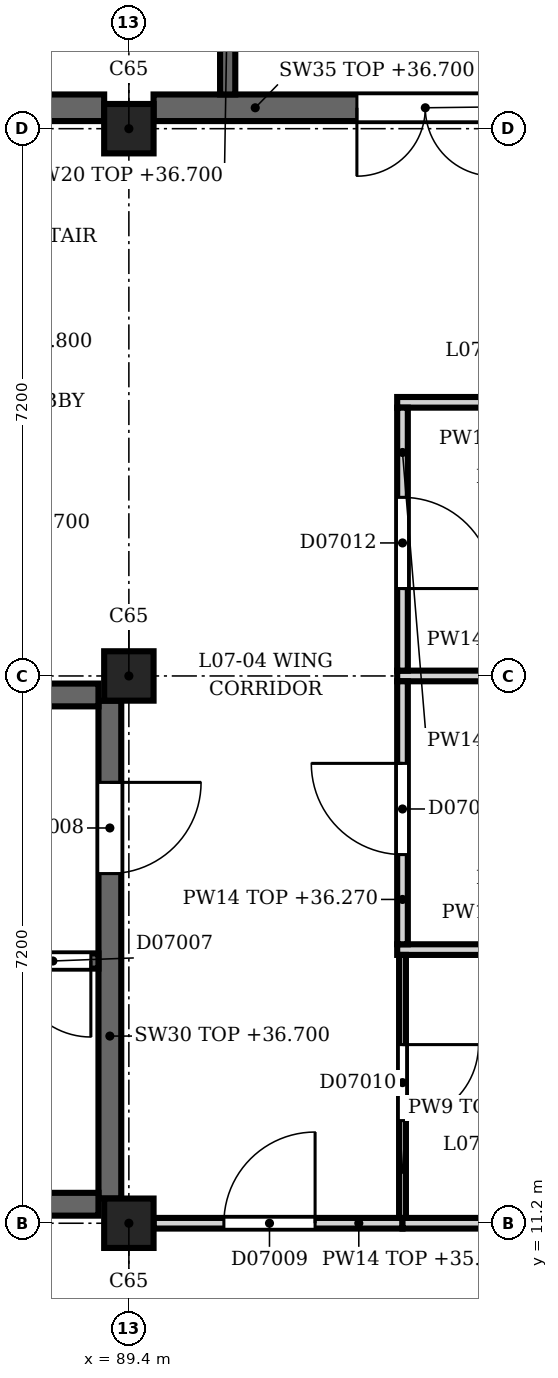
"""IFC4 building model, lengths in metres.
Left out: names, types, materials, properties, quantities, classifications, styles, units other than length and angle.
Written with IfcOpenShell. Run it as: python <this file> out.ifc"""

import sys

from ifc_helpers import new_model, si_unit, direction, frame, frame_2d, origin, origin_2d, place, context, subcontext, project, spatial, rectangle, extrude, element, fill, save


model = new_model("IFC4")
c1 = context("Model", 3, precision=1e-05, world=origin(), true_north=direction((0.0, 1.0)))
c2 = subcontext(c1, "Body", "Model", "MODEL_VIEW")
j1 = project(units=[si_unit("LENGTHUNIT", "METRE"), si_unit("PLANEANGLEUNIT", "RADIAN")], contexts=[c1])
p1 = place(None, origin())
s1 = spatial("IfcSite", under=j1, at=p1, CompositionType="ELEMENT")
p2 = place(p1, origin())
s2 = spatial("IfcBuilding", under=s1, at=p2, CompositionType="ELEMENT")
p3 = place(p2, frame((0.0, 0.0, 32.4)))
s3 = spatial("IfcBuildingStorey", under=s2, at=p3, CompositionType="ELEMENT", Elevation=32.4)
for number, where, z_axis, x_axis in (
    (1, (89.4, 11.2, 0.0), (0.0, 0.0, 1.0), (1.0, 0.0, 0.0)),
    (2, (89.4, 18.4, 0.0), (0.0, 0.0, 1.0), (1.0, 0.0, 0.0)),
    (3, (89.4, 25.6, 0.0), (0.0, 0.0, 1.0), (1.0, 0.0, 0.0)),
):
    element("IfcColumn", number, at=place(p3, frame(where, z_axis=z_axis, x_axis=x_axis)), inside=s3, PredefinedType="COLUMN", context=c2, shape_type="SweptSolid", body=[
        extrude(rectangle(XDim=0.65, YDim=0.65, at=origin_2d()), origin(), (0.0, 0.0, 1.0), 4.5),
    ])
p4 = place(p3, frame((82.45, 25.875, 0.0), z_axis=(0.0, 0.0, 1.0), x_axis=(1.0, 0.0, 0.0)))
e4 = element("IfcWall", 4, at=p4, inside=s3, PredefinedType="SHEAR", context=c2, shape_type="SweptSolid", body=[
    extrude(rectangle(XDim=6.625, YDim=0.35, at=frame_2d((3.312, 0.0))), origin(), (0.0, 0.0, 1.0), 4.3),
])
p5 = place(p4, frame((3.95, 0.0, 0.0)))
e5 = element("IfcOpeningElement", 5, at=p5, cuts=e4, PredefinedType="OPENING", context=c2, shape_type="SweptSolid", body=[
    extrude(rectangle(XDim=1.2, YDim=2.1, at=frame_2d((0.6, 1.05))), frame((0.0, 0.185, 0.0), z_axis=(0.0, -1.0, 0.0), x_axis=(1.0, 0.0, 0.0)), (0.0, 0.0, 1.0), 0.37),
])
p6 = place(p3, frame((89.725, 25.875, 0.0), z_axis=(0.0, 0.0, 1.0), x_axis=(1.0, 0.0, 0.0)))
e6 = element("IfcWall", 6, at=p6, inside=s3, PredefinedType="SHEAR", context=c2, shape_type="SweptSolid", body=[
    extrude(rectangle(XDim=6.55, YDim=0.35, at=frame_2d((3.275, 0.0))), origin(), (0.0, 0.0, 1.0), 4.3),
])
p7 = place(p6, frame((2.675, 0.0, 0.0)))
e7 = element("IfcOpeningElement", 7, at=p7, cuts=e6, PredefinedType="OPENING", context=c2, shape_type="SweptSolid", body=[
    extrude(rectangle(XDim=1.8, YDim=2.1, at=frame_2d((0.9, 1.05))), frame((0.0, 0.185, 0.0), z_axis=(0.0, -1.0, 0.0), x_axis=(1.0, 0.0, 0.0)), (0.0, 0.0, 1.0), 0.37),
])
p8 = place(p3, frame((90.7, 26.05, 0.0), z_axis=(0.0, 0.0, 1.0), x_axis=(0.0, 1.0, 0.0)))
e8 = element("IfcWall", 8, at=p8, inside=s3, PredefinedType="SHEAR", context=c2, shape_type="SweptSolid", body=[
    extrude(rectangle(XDim=3.05, YDim=0.2, at=frame_2d((1.525, 0.0))), origin(), (0.0, 0.0, 1.0), 4.3),
])
p9 = place(p3, frame((89.15, 11.525, 0.0), z_axis=(0.0, 0.0, 1.0), x_axis=(0.0, 1.0, 0.0)))
e9 = element("IfcWall", 9, at=p9, inside=s3, PredefinedType="SHEAR", context=c2, shape_type="SweptSolid", body=[
    extrude(rectangle(XDim=6.55, YDim=0.3, at=frame_2d((3.275, 0.0))), origin(), (0.0, 0.0, 1.0), 4.3),
])
p10 = place(p9, frame((4.275, 0.0, 0.0)))
e10 = element("IfcOpeningElement", 10, at=p10, cuts=e9, PredefinedType="OPENING", context=c2, shape_type="SweptSolid", body=[
    extrude(rectangle(XDim=1.2, YDim=2.1, at=frame_2d((0.6, 1.05))), frame((0.0, 0.16, 0.0), z_axis=(0.0, -1.0, 0.0), x_axis=(1.0, 0.0, 0.0)), (0.0, 0.0, 1.0), 0.32),
])
for number, where, z_axis, x_axis in (
    (11, (82.6, 11.45, 0.0), (0.0, 0.0, 1.0), (1.0, 0.0, 0.0)),
    (12, (82.6, 18.15, 0.0), (0.0, 0.0, 1.0), (1.0, 0.0, 0.0)),
):
    element("IfcWall", number, at=place(p3, frame(where, z_axis=z_axis, x_axis=x_axis)), inside=s3, PredefinedType="SHEAR", context=c2, shape_type="SweptSolid", body=[
        extrude(rectangle(XDim=6.4, YDim=0.3, at=frame_2d((3.2, 0.0))), origin(), (0.0, 0.0, 1.0), 4.3),
    ])
p11 = place(p3, frame((89.0, 14.65, 0.0), z_axis=(0.0, 0.0, 1.0), x_axis=(-1.0, 0.0, 0.0)))
e13 = element("IfcWall", 13, at=p11, inside=s3, PredefinedType="SHEAR", context=c2, shape_type="SweptSolid", body=[
    extrude(rectangle(XDim=6.4, YDim=0.2, at=frame_2d((3.2, 0.0))), origin(), (0.0, 0.0, 1.0), 4.3),
])
p12 = place(p11, frame((0.1, 0.0, 0.0)))
e14 = element("IfcOpeningElement", 14, at=p12, cuts=e13, PredefinedType="OPENING", context=c2, shape_type="SweptSolid", body=[
    extrude(rectangle(XDim=1.0, YDim=2.1, at=frame_2d((0.5, 1.05))), frame((0.0, 0.11, 0.0), z_axis=(0.0, -1.0, 0.0), x_axis=(1.0, 0.0, 0.0)), (0.0, 0.0, 1.0), 0.22),
])
p13 = place(p3, frame((93.0, 11.2, 0.0), z_axis=(0.0, 0.0, 1.0), x_axis=(-1.0, 0.0, 0.0)))
e15 = element("IfcWall", 15, at=p13, inside=s3, PredefinedType="PARTITIONING", context=c2, shape_type="SweptSolid", body=[
    extrude(rectangle(XDim=3.275, YDim=0.14, at=frame_2d((1.637, 0.0))), origin(), (0.0, 0.0, 1.0), 3.47),
])
p14 = place(p13, frame((1.15, 0.0, 0.0)))
e16 = element("IfcOpeningElement", 16, at=p14, cuts=e15, PredefinedType="OPENING", context=c2, shape_type="SweptSolid", body=[
    extrude(rectangle(XDim=1.2, YDim=2.1, at=frame_2d((0.6, 1.05))), frame((0.0, 0.08, 0.0), z_axis=(0.0, -1.0, 0.0), x_axis=(1.0, 0.0, 0.0)), (0.0, 0.0, 1.0), 0.16),
])
p15 = place(p3, frame((93.0, 11.2, 0.0), z_axis=(0.0, 0.0, 1.0), x_axis=(1.0, 0.0, 0.0)))
e17 = element("IfcWall", 17, at=p15, inside=s3, PredefinedType="PARTITIONING", context=c2, shape_type="SweptSolid", body=[
    extrude(rectangle(XDim=3.275, YDim=0.14, at=frame_2d((1.637, 0.0))), origin(), (0.0, 0.0, 1.0), 3.47),
])
p16 = place(p3, frame((92.93, 14.8, 0.0), z_axis=(0.0, 0.0, 1.0), x_axis=(1.0, 0.0, 0.0)))
e18 = element("IfcWall", 18, at=p16, inside=s3, PredefinedType="PARTITIONING", context=c2, shape_type="SweptSolid", body=[
    extrude(rectangle(XDim=3.74, YDim=0.14, at=frame_2d((1.87, 0.0))), origin(), (0.0, 0.0, 1.0), 4.3),
])
p17 = place(p3, frame((92.93, 18.4, 0.0), z_axis=(0.0, 0.0, 1.0), x_axis=(1.0, 0.0, 0.0)))
e19 = element("IfcWall", 19, at=p17, inside=s3, PredefinedType="PARTITIONING", context=c2, shape_type="SweptSolid", body=[
    extrude(rectangle(XDim=3.345, YDim=0.14, at=frame_2d((1.672, 0.0))), origin(), (0.0, 0.0, 1.0), 3.47),
])
p18 = place(p3, frame((92.93, 22.0, 0.0), z_axis=(0.0, 0.0, 1.0), x_axis=(1.0, 0.0, 0.0)))
e20 = element("IfcWall", 20, at=p18, inside=s3, PredefinedType="PARTITIONING", context=c2, shape_type="SweptSolid", body=[
    extrude(rectangle(XDim=3.67, YDim=0.14, at=frame_2d((1.835, 0.0))), origin(), (0.0, 0.0, 1.0), 4.3),
])
p19 = place(p3, frame((93.0, 14.73, 0.0), z_axis=(0.0, 0.0, 1.0), x_axis=(0.0, -1.0, 0.0)))
e21 = element("IfcWall", 21, at=p19, inside=s3, PredefinedType="PARTITIONING", context=c2, shape_type="SweptSolid", body=[
    extrude(rectangle(XDim=3.46, YDim=0.09, at=frame_2d((1.73, 0.0))), origin(), (0.0, 0.0, 1.0), 3.87),
])
p20 = place(p19, frame((1.18, 0.0, 0.0)))
e22 = element("IfcOpeningElement", 22, at=p20, cuts=e21, PredefinedType="OPENING", context=c2, shape_type="SweptSolid", body=[
    extrude(rectangle(XDim=1.0, YDim=2.2, at=frame_2d((0.5, 1.1))), frame((0.0, 0.055, 0.0), z_axis=(0.0, -1.0, 0.0), x_axis=(1.0, 0.0, 0.0)), (0.0, 0.0, 1.0), 0.11),
])
p21 = place(p3, frame((93.0, 18.33, 0.0), z_axis=(0.0, 0.0, 1.0), x_axis=(0.0, -1.0, 0.0)))
e23 = element("IfcWall", 23, at=p21, inside=s3, PredefinedType="PARTITIONING", context=c2, shape_type="SweptSolid", body=[
    extrude(rectangle(XDim=3.46, YDim=0.14, at=frame_2d((1.73, 0.0))), origin(), (0.0, 0.0, 1.0), 3.87),
])
p22 = place(p21, frame((1.08, 0.0, 0.0)))
e24 = element("IfcOpeningElement", 24, at=p22, cuts=e23, PredefinedType="OPENING", context=c2, shape_type="SweptSolid", body=[
    extrude(rectangle(XDim=1.2, YDim=2.2, at=frame_2d((0.6, 1.1))), frame((0.0, 0.08, 0.0), z_axis=(0.0, -1.0, 0.0), x_axis=(1.0, 0.0, 0.0)), (0.0, 0.0, 1.0), 0.16),
])
p23 = place(p3, frame((93.0, 21.93, 0.0), z_axis=(0.0, 0.0, 1.0), x_axis=(0.0, -1.0, 0.0)))
e25 = element("IfcWall", 25, at=p23, inside=s3, PredefinedType="PARTITIONING", context=c2, shape_type="SweptSolid", body=[
    extrude(rectangle(XDim=3.46, YDim=0.14, at=frame_2d((1.73, 0.0))), origin(), (0.0, 0.0, 1.0), 4.3),
])
p24 = place(p23, frame((1.18, 0.0, 0.0)))
e26 = element("IfcOpeningElement", 26, at=p24, cuts=e25, PredefinedType="OPENING", context=c2, shape_type="SweptSolid", body=[
    extrude(rectangle(XDim=1.2, YDim=2.2, at=frame_2d((0.6, 1.1))), frame((0.0, 0.08, 0.0), z_axis=(0.0, -1.0, 0.0), x_axis=(1.0, 0.0, 0.0)), (0.0, 0.0, 1.0), 0.16),
])
p25 = place(p7, origin())
e27 = element("IfcDoor", 27, at=p25, inside=s3, OperationType="SINGLE_SWING_LEFT", PredefinedType="DOOR", context=c2, shape_type="SweptSolid", body=[
    extrude(rectangle(XDim=1.8, YDim=2.1, at=frame_2d((0.9, 1.05))), frame((0.0, 0.025, 0.0), z_axis=(0.0, -1.0, 0.0), x_axis=(1.0, 0.0, 0.0)), (0.0, 0.0, 1.0), 0.05),
])
fill(e7, e27)
p26 = place(p10, origin())
e28 = element("IfcDoor", 28, at=p26, inside=s3, OperationType="SINGLE_SWING_RIGHT", PredefinedType="DOOR", context=c2, shape_type="SweptSolid", body=[
    extrude(rectangle(XDim=1.2, YDim=2.1, at=frame_2d((0.6, 1.05))), frame((0.0, 0.025, 0.0), z_axis=(0.0, -1.0, 0.0), x_axis=(1.0, 0.0, 0.0)), (0.0, 0.0, 1.0), 0.05),
])
fill(e10, e28)
p27 = place(p12, origin())
e29 = element("IfcDoor", 29, at=p27, inside=s3, OperationType="SINGLE_SWING_LEFT", PredefinedType="DOOR", context=c2, shape_type="SweptSolid", body=[
    extrude(rectangle(XDim=1.0, YDim=2.1, at=frame_2d((0.5, 1.05))), frame((0.0, 0.025, 0.0), z_axis=(0.0, -1.0, 0.0), x_axis=(1.0, 0.0, 0.0)), (0.0, 0.0, 1.0), 0.05),
])
fill(e14, e29)
p28 = place(p14, origin())
e30 = element("IfcDoor", 30, at=p28, inside=s3, OperationType="SINGLE_SWING_RIGHT", PredefinedType="DOOR", context=c2, shape_type="SweptSolid", body=[
    extrude(rectangle(XDim=1.2, YDim=2.1, at=frame_2d((0.6, 1.05))), frame((0.0, 0.025, 0.0), z_axis=(0.0, -1.0, 0.0), x_axis=(1.0, 0.0, 0.0)), (0.0, 0.0, 1.0), 0.05),
])
fill(e16, e30)
p29 = place(p20, origin())
e31 = element("IfcDoor", 31, at=p29, inside=s3, OperationType="SINGLE_SWING_LEFT", PredefinedType="DOOR", context=c2, shape_type="SweptSolid", body=[
    extrude(rectangle(XDim=1.0, YDim=2.2, at=frame_2d((0.5, 1.1))), frame((0.0, 0.025, 0.0), z_axis=(0.0, -1.0, 0.0), x_axis=(1.0, 0.0, 0.0)), (0.0, 0.0, 1.0), 0.05),
])
fill(e22, e31)
p30 = place(p22, origin())
e32 = element("IfcDoor", 32, at=p30, inside=s3, OperationType="SINGLE_SWING_LEFT", PredefinedType="DOOR", context=c2, shape_type="SweptSolid", body=[
    extrude(rectangle(XDim=1.2, YDim=2.2, at=frame_2d((0.6, 1.1))), frame((0.0, 0.025, 0.0), z_axis=(0.0, -1.0, 0.0), x_axis=(1.0, 0.0, 0.0)), (0.0, 0.0, 1.0), 0.05),
])
fill(e24, e32)
p31 = place(p24, origin())
e33 = element("IfcDoor", 33, at=p31, inside=s3, OperationType="SINGLE_SWING_RIGHT", PredefinedType="DOOR", context=c2, shape_type="SweptSolid", body=[
    extrude(rectangle(XDim=1.2, YDim=2.2, at=frame_2d((0.6, 1.1))), frame((0.0, 0.025, 0.0), z_axis=(0.0, -1.0, 0.0), x_axis=(1.0, 0.0, 0.0)), (0.0, 0.0, 1.0), 0.05),
])
fill(e26, e33)
save(model, sys.argv[1])
